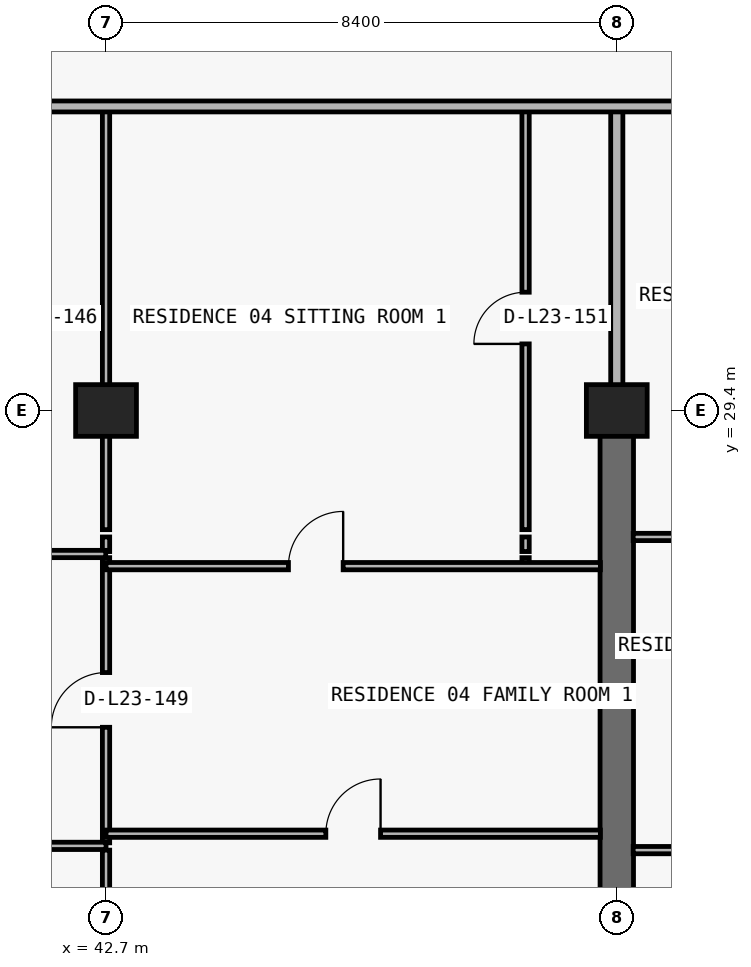
"""IFC4 building model, lengths in metres.
Left out: names, types, materials, properties, quantities, classifications, styles, units other than length and angle.
Written with IfcOpenShell. Run it as: python <this file> out.ifc"""

import sys

from ifc_helpers import new_model, si_unit, direction, frame, frame_2d, origin, origin_2d, place, context, subcontext, project, spatial, rectangle, extrude, element, fill, save


model = new_model("IFC4")
c1 = context("Model", 3, precision=1e-05, world=origin(), true_north=direction((0.0, 1.0)))
c2 = subcontext(c1, "Body", "Model", "MODEL_VIEW")
j1 = project(units=[si_unit("LENGTHUNIT", "METRE"), si_unit("PLANEANGLEUNIT", "RADIAN")], contexts=[c1])
p1 = place(None, origin())
s1 = spatial("IfcSite", under=j1, at=p1, CompositionType="ELEMENT")
p2 = place(p1, origin())
s2 = spatial("IfcBuilding", under=s1, at=p2, CompositionType="ELEMENT")
p3 = place(p2, frame((0.0, 0.0, 87.9)))
s3 = spatial("IfcBuildingStorey", under=s2, at=p3, CompositionType="ELEMENT", Elevation=87.9)
for number, where, z_axis, x_axis in (
    (1, (42.7, 29.4, 0.0), (0.0, 0.0, 1.0), (1.0, 0.0, 0.0)),
    (2, (51.1, 29.4, 0.0), (0.0, 0.0, 1.0), (1.0, 0.0, 0.0)),
):
    element("IfcColumn", number, at=place(p3, frame(where, z_axis=z_axis, x_axis=x_axis)), inside=s3, PredefinedType="COLUMN", context=c2, shape_type="SweptSolid", body=[
        extrude(rectangle(XDim=1.0, YDim=0.85, at=origin_2d()), origin(), (0.0, 0.0, 1.0), 3.05),
    ])
p4 = place(p3, frame((51.1, 20.8, 0.0), z_axis=(0.0, 0.0, 1.0), x_axis=(0.0, 1.0, 0.0)))
e3 = element("IfcWall", 3, at=p4, inside=s3, PredefinedType="SHEAR", context=c2, shape_type="SweptSolid", body=[
    extrude(rectangle(XDim=8.6, YDim=0.55, at=frame_2d((4.3, 0.0))), origin(), (0.0, 0.0, 1.0), 3.05),
])
p5 = place(p3, frame((42.7, 8.84, 0.0), z_axis=(0.0, 0.0, 1.0), x_axis=(0.0, 1.0, 0.0)))
e4 = element("IfcWall", 4, at=p5, inside=s3, PredefinedType="PARTITIONING", context=c2, shape_type="SweptSolid", body=[
    extrude(rectangle(XDim=13.33, YDim=0.12, at=frame_2d((6.665, 0.0))), origin(), (0.0, 0.0, 1.0), 2.174),
])
p6 = place(p3, frame((42.7, 22.29, 0.0), z_axis=(0.0, 0.0, 1.0), x_axis=(0.0, 1.0, 0.0)))
e5 = element("IfcWall", 5, at=p6, inside=s3, PredefinedType="PARTITIONING", context=c2, shape_type="SweptSolid", body=[
    extrude(rectangle(XDim=4.69, YDim=0.12, at=frame_2d((2.345, 0.0))), origin(), (0.0, 0.0, 1.0), 2.174),
])
p7 = place(p6, frame((1.9, 0.0, 0.0)))
e6 = element("IfcOpeningElement", 6, at=p7, cuts=e5, PredefinedType="OPENING", context=c2, shape_type="SweptSolid", body=[
    extrude(rectangle(XDim=0.9, YDim=2.124, at=frame_2d((0.45, 1.062))), frame((0.0, 0.07, 0.0), z_axis=(0.0, -1.0, 0.0), x_axis=(1.0, 0.0, 0.0)), (0.0, 0.0, 1.0), 0.14),
])
p8 = place(p3, frame((42.7, 27.08, 0.0), z_axis=(0.0, 0.0, 1.0), x_axis=(0.0, 1.0, 0.0)))
e7 = element("IfcWall", 7, at=p8, inside=s3, PredefinedType="PARTITIONING", context=c2, shape_type="SweptSolid", body=[
    extrude(rectangle(XDim=0.24, YDim=0.12, at=frame_2d((0.12, 0.0))), origin(), (0.0, 0.0, 1.0), 2.174),
])
p9 = place(p3, frame((42.7, 27.44, 0.0), z_axis=(0.0, 0.0, 1.0), x_axis=(0.0, 1.0, 0.0)))
e8 = element("IfcWall", 8, at=p9, inside=s3, PredefinedType="PARTITIONING", context=c2, shape_type="SweptSolid", body=[
    extrude(rectangle(XDim=6.96, YDim=0.12, at=frame_2d((3.48, 0.0))), origin(), (0.0, 0.0, 1.0), 2.174),
])
p10 = place(p3, frame((49.6, 26.84, 0.0), z_axis=(0.0, 0.0, 1.0), x_axis=(0.0, 1.0, 0.0)))
e9 = element("IfcWall", 9, at=p10, inside=s3, PredefinedType="PARTITIONING", context=c2, shape_type="SweptSolid", body=[
    extrude(rectangle(XDim=0.14, YDim=0.12, at=frame_2d((0.07, 0.0))), origin(), (0.0, 0.0, 1.0), 3.05),
])
p11 = place(p3, frame((49.6, 27.08, 0.0), z_axis=(0.0, 0.0, 1.0), x_axis=(0.0, 1.0, 0.0)))
e10 = element("IfcWall", 10, at=p11, inside=s3, PredefinedType="PARTITIONING", context=c2, shape_type="SweptSolid", body=[
    extrude(rectangle(XDim=0.24, YDim=0.12, at=frame_2d((0.12, 0.0))), origin(), (0.0, 0.0, 1.0), 3.05),
])
p12 = place(p3, frame((49.6, 27.44, 0.0), z_axis=(0.0, 0.0, 1.0), x_axis=(0.0, 1.0, 0.0)))
e11 = element("IfcWall", 11, at=p12, inside=s3, PredefinedType="PARTITIONING", context=c2, shape_type="SweptSolid", body=[
    extrude(rectangle(XDim=6.96, YDim=0.12, at=frame_2d((3.48, 0.0))), origin(), (0.0, 0.0, 1.0), 3.05),
])
p13 = place(p12, frame((3.055, 0.0, 0.0)))
e12 = element("IfcOpeningElement", 12, at=p13, cuts=e11, PredefinedType="OPENING", context=c2, shape_type="SweptSolid", body=[
    extrude(rectangle(XDim=0.85, YDim=2.1, at=frame_2d((0.425, 1.05))), frame((0.0, 0.07, 0.0), z_axis=(0.0, -1.0, 0.0), x_axis=(1.0, 0.0, 0.0)), (0.0, 0.0, 1.0), 0.14),
])
p14 = place(p3, frame((51.1, 29.405, 0.0), z_axis=(0.0, 0.0, 1.0), x_axis=(0.0, 1.0, 0.0)))
e13 = element("IfcWall", 13, at=p14, inside=s3, PredefinedType="PARTITIONING", context=c2, shape_type="SweptSolid", body=[
    extrude(rectangle(XDim=4.995, YDim=0.2, at=frame_2d((2.498, 0.0))), origin(), (0.0, 0.0, 1.0), 2.335),
])
p15 = place(p3, frame((51.37, 22.17, 0.0), z_axis=(0.0, 0.0, 1.0), x_axis=(1.0, 0.0, 0.0)))
e14 = element("IfcWall", 14, at=p15, inside=s3, PredefinedType="PARTITIONING", context=c2, shape_type="SweptSolid", body=[
    extrude(rectangle(XDim=4.516, YDim=0.12, at=frame_2d((2.258, 0.0))), origin(), (0.0, 0.0, 1.0), 3.05),
])
p16 = place(p15, frame((1.389, 0.0, 0.0)))
e15 = element("IfcOpeningElement", 15, at=p16, cuts=e14, PredefinedType="OPENING", context=c2, shape_type="SweptSolid", body=[
    extrude(rectangle(XDim=0.9, YDim=2.15, at=frame_2d((0.45, 1.075))), frame((0.0, 0.07, 0.0), z_axis=(0.0, -1.0, 0.0), x_axis=(1.0, 0.0, 0.0)), (0.0, 0.0, 1.0), 0.14),
])
p17 = place(p3, frame((35.1, 22.24, 0.0), z_axis=(0.0, 0.0, 1.0), x_axis=(1.0, 0.0, 0.0)))
e16 = element("IfcWall", 16, at=p17, inside=s3, PredefinedType="PARTITIONING", context=c2, shape_type="SweptSolid", body=[
    extrude(rectangle(XDim=7.6, YDim=0.12, at=frame_2d((3.8, 0.0))), origin(), (0.0, 0.0, 1.0), 3.05),
])
p18 = place(p17, frame((3.35, 0.0, 0.0)))
e17 = element("IfcOpeningElement", 17, at=p18, cuts=e16, PredefinedType="OPENING", context=c2, shape_type="SweptSolid", body=[
    extrude(rectangle(XDim=0.9, YDim=2.15, at=frame_2d((0.45, 1.075))), frame((0.0, 0.07, 0.0), z_axis=(0.0, -1.0, 0.0), x_axis=(1.0, 0.0, 0.0)), (0.0, 0.0, 1.0), 0.14),
])
p19 = place(p3, frame((42.7, 22.44, 0.0), z_axis=(0.0, 0.0, 1.0), x_axis=(1.0, 0.0, 0.0)))
e18 = element("IfcWall", 18, at=p19, inside=s3, PredefinedType="PARTITIONING", context=c2, shape_type="SweptSolid", body=[
    extrude(rectangle(XDim=8.13, YDim=0.12, at=frame_2d((4.065, 0.0))), origin(), (0.0, 0.0, 1.0), 3.05),
])
p20 = place(p19, frame((3.615, 0.0, 0.0)))
e19 = element("IfcOpeningElement", 19, at=p20, cuts=e18, PredefinedType="OPENING", context=c2, shape_type="SweptSolid", body=[
    extrude(rectangle(XDim=0.9, YDim=2.15, at=frame_2d((0.45, 1.075))), frame((0.0, 0.07, 0.0), z_axis=(0.0, -1.0, 0.0), x_axis=(1.0, 0.0, 0.0)), (0.0, 0.0, 1.0), 0.14),
])
p21 = place(p3, frame((42.7, 26.84, 0.0), z_axis=(0.0, 0.0, 1.0), x_axis=(1.0, 0.0, 0.0)))
e20 = element("IfcWall", 20, at=p21, inside=s3, PredefinedType="PARTITIONING", context=c2, shape_type="SweptSolid", body=[
    extrude(rectangle(XDim=8.13, YDim=0.12, at=frame_2d((4.065, 0.0))), origin(), (0.0, 0.0, 1.0), 3.05),
])
p22 = place(p21, frame((3.0, 0.0, 0.0)))
e21 = element("IfcOpeningElement", 21, at=p22, cuts=e20, PredefinedType="OPENING", context=c2, shape_type="SweptSolid", body=[
    extrude(rectangle(XDim=0.9, YDim=2.15, at=frame_2d((0.45, 1.075))), frame((0.0, 0.07, 0.0), z_axis=(0.0, -1.0, 0.0), x_axis=(1.0, 0.0, 0.0)), (0.0, 0.0, 1.0), 0.14),
])
p23 = place(p3, frame((35.1, 27.04, 0.0), z_axis=(0.0, 0.0, 1.0), x_axis=(1.0, 0.0, 0.0)))
e22 = element("IfcWall", 22, at=p23, inside=s3, PredefinedType="PARTITIONING", context=c2, shape_type="SweptSolid", body=[
    extrude(rectangle(XDim=7.595, YDim=0.12, at=frame_2d((3.797, 0.0))), origin(), (0.0, 0.0, 1.0), 3.05),
])
p24 = place(p23, frame((2.6, 0.0, 0.0)))
e23 = element("IfcOpeningElement", 23, at=p24, cuts=e22, PredefinedType="OPENING", context=c2, shape_type="SweptSolid", body=[
    extrude(rectangle(XDim=0.9, YDim=2.15, at=frame_2d((0.45, 1.075))), frame((0.0, 0.07, 0.0), z_axis=(0.0, -1.0, 0.0), x_axis=(1.0, 0.0, 0.0)), (0.0, 0.0, 1.0), 0.14),
])
p25 = place(p3, frame((51.37, 27.32, 0.0), z_axis=(0.0, 0.0, 1.0), x_axis=(1.0, 0.0, 0.0)))
e24 = element("IfcWall", 24, at=p25, inside=s3, PredefinedType="PARTITIONING", context=c2, shape_type="SweptSolid", body=[
    extrude(rectangle(XDim=4.516, YDim=0.12, at=frame_2d((2.258, 0.0))), origin(), (0.0, 0.0, 1.0), 3.05),
])
p26 = place(p25, frame((1.808, 0.0, 0.0)))
e25 = element("IfcOpeningElement", 25, at=p26, cuts=e24, PredefinedType="OPENING", context=c2, shape_type="SweptSolid", body=[
    extrude(rectangle(XDim=0.9, YDim=2.15, at=frame_2d((0.45, 1.075))), frame((0.0, 0.07, 0.0), z_axis=(0.0, -1.0, 0.0), x_axis=(1.0, 0.0, 0.0)), (0.0, 0.0, 1.0), 0.14),
])
p27 = place(p3, frame((26.7, 34.4, 0.0), z_axis=(0.0, 0.0, 1.0), x_axis=(1.0, 0.0, 0.0)))
e26 = element("IfcWall", 26, at=p27, inside=s3, PredefinedType="PARTITIONING", context=c2, shape_type="SweptSolid", body=[
    extrude(rectangle(XDim=29.186, YDim=0.18, at=frame_2d((14.593, 0.0))), origin(), (0.0, 0.0, 1.0), 3.05),
])
p28 = place(p27, frame((2.875, 0.0, 0.0)))
e27 = element("IfcOpeningElement", 27, at=p28, cuts=e26, PredefinedType="OPENING", context=c2, shape_type="SweptSolid", body=[
    extrude(rectangle(XDim=1.0, YDim=2.2, at=frame_2d((0.5, 1.1))), frame((0.0, 0.1, 0.0), z_axis=(0.0, -1.0, 0.0), x_axis=(1.0, 0.0, 0.0)), (0.0, 0.0, 1.0), 0.2),
])
p29 = place(p27, frame((10.95, 0.0, 0.0)))
e28 = element("IfcOpeningElement", 28, at=p29, cuts=e26, PredefinedType="OPENING", context=c2, shape_type="SweptSolid", body=[
    extrude(rectangle(XDim=1.0, YDim=2.2, at=frame_2d((0.5, 1.1))), frame((0.0, 0.1, 0.0), z_axis=(0.0, -1.0, 0.0), x_axis=(1.0, 0.0, 0.0)), (0.0, 0.0, 1.0), 0.2),
])
p30 = place(p27, frame((26.293, 0.0, 0.0)))
e29 = element("IfcOpeningElement", 29, at=p30, cuts=e26, PredefinedType="OPENING", context=c2, shape_type="SweptSolid", body=[
    extrude(rectangle(XDim=1.0, YDim=2.2, at=frame_2d((0.5, 1.1))), frame((0.0, 0.1, 0.0), z_axis=(0.0, -1.0, 0.0), x_axis=(1.0, 0.0, 0.0)), (0.0, 0.0, 1.0), 0.2),
])
p31 = place(p7, origin())
e30 = element("IfcDoor", 30, at=p31, inside=s3, OperationType="SINGLE_SWING_LEFT", PredefinedType="DOOR", context=c2, shape_type="SweptSolid", body=[
    extrude(rectangle(XDim=0.9, YDim=2.124, at=frame_2d((0.45, 1.062))), frame((0.0, 0.025, 0.0), z_axis=(0.0, -1.0, 0.0), x_axis=(1.0, 0.0, 0.0)), (0.0, 0.0, 1.0), 0.05),
])
fill(e6, e30)
p32 = place(p22, origin())
e31 = element("IfcDoor", 31, at=p32, inside=s3, OperationType="SINGLE_SWING_RIGHT", PredefinedType="DOOR", context=c2, shape_type="SweptSolid", body=[
    extrude(rectangle(XDim=0.9, YDim=2.15, at=frame_2d((0.45, 1.075))), frame((0.0, 0.025, 0.0), z_axis=(0.0, -1.0, 0.0), x_axis=(1.0, 0.0, 0.0)), (0.0, 0.0, 1.0), 0.05),
])
fill(e21, e31)
p33 = place(p13, origin())
e32 = element("IfcDoor", 32, at=p33, inside=s3, OperationType="SINGLE_SWING_LEFT", PredefinedType="DOOR", context=c2, shape_type="SweptSolid", body=[
    extrude(rectangle(XDim=0.85, YDim=2.1, at=frame_2d((0.425, 1.05))), frame((0.0, 0.025, 0.0), z_axis=(0.0, -1.0, 0.0), x_axis=(1.0, 0.0, 0.0)), (0.0, 0.0, 1.0), 0.05),
])
fill(e12, e32)
p34 = place(p20, origin())
e33 = element("IfcDoor", 33, at=p34, inside=s3, OperationType="SINGLE_SWING_RIGHT", PredefinedType="DOOR", context=c2, shape_type="SweptSolid", body=[
    extrude(rectangle(XDim=0.9, YDim=2.15, at=frame_2d((0.45, 1.075))), frame((0.0, 0.025, 0.0), z_axis=(0.0, -1.0, 0.0), x_axis=(1.0, 0.0, 0.0)), (0.0, 0.0, 1.0), 0.05),
])
fill(e19, e33)
save(model, sys.argv[1])
